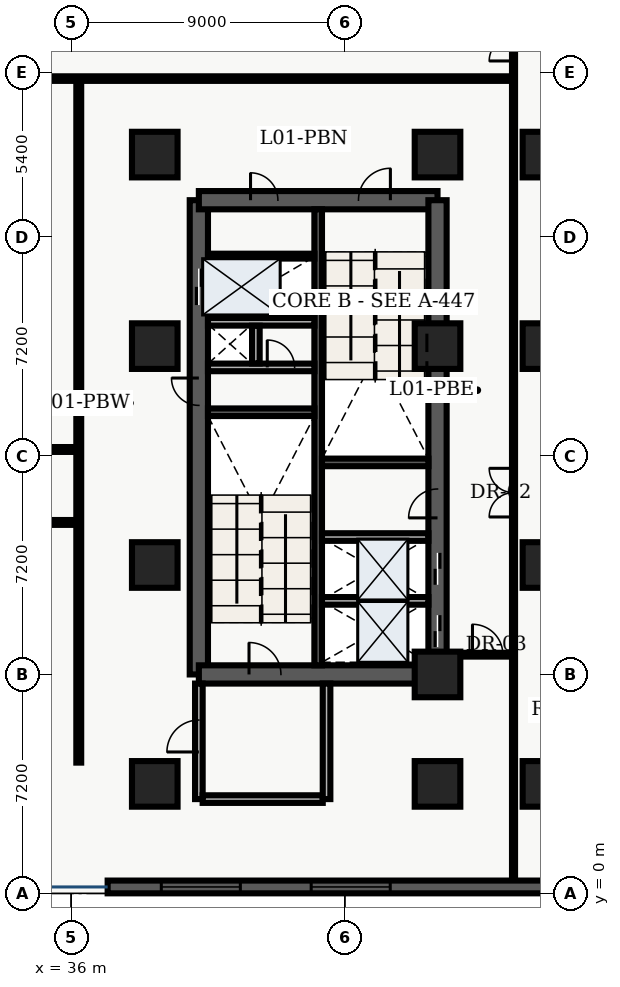
"""IFC4 building model, lengths in metres.
Left out: names, types, materials, properties, quantities, classifications, styles, units other than length and angle.
Written with IfcOpenShell. Run it as: python <this file> out.ifc"""

import sys

from ifc_helpers import new_model, entity, si_unit, converted_unit, direction, frame, origin_with_axes, origin_2d_with_axis, place, context, subcontext, project, spatial, polyline, rectangle, outline, extrude, element, fill, save


model = new_model("IFC4")
c1 = context("Model", 3, precision=1e-05, world=origin_with_axes(), true_north=direction((0.0, 1.0)))
c2 = subcontext(c1, "Body", "Model", "MODEL_VIEW")
j1 = project(units=[si_unit("LENGTHUNIT", "METRE"), converted_unit("PLANEANGLEUNIT", "DEGREE", entity("IfcPlaneAngleMeasure", 0.017), si_unit("PLANEANGLEUNIT", "RADIAN"), dimensions=[0, 0, 0, 0, 0, 0, 0])], contexts=[c1])
p1 = place(None, origin_with_axes())
s1 = spatial("IfcSite", under=j1, at=p1, CompositionType="ELEMENT")
p2 = place(p1, origin_with_axes())
s2 = spatial("IfcBuilding", under=s1, at=p2, CompositionType="ELEMENT")
p3 = place(p2, frame((0.0, 0.0, 5.7), z_axis=(0.0, 0.0, 1.0), x_axis=(1.0, 0.0, 0.0)))
s3 = spatial("IfcBuildingStorey", under=s2, at=p3, CompositionType="ELEMENT", Elevation=5.7)
p4 = place(p3, frame((40.2, 7.2, 0.0), z_axis=(0.0, 0.0, 1.0), x_axis=(0.0, 1.0, 0.0)))
e1 = element("IfcWall", 1, at=p4, inside=s3, PredefinedType="SHEAR", context=c2, shape_type="SweptSolid", body=[
    extrude(outline(polyline([(0.0, -0.3), (15.6, -0.3), (15.6, 0.3), (0.0, 0.3), (0.0, -0.3)])), origin_with_axes(), (0.0, 0.0, 1.0), 4.86),
])
p5 = place(p4, frame((12.75, 0.0, 0.0), z_axis=(0.0, 0.0, 1.0), x_axis=(1.0, 0.0, 0.0)))
e2 = element("IfcOpeningElement", 2, at=p5, cuts=e1, PredefinedType="OPENING", context=c2, shape_type="SweptSolid", body=[
    extrude(rectangle(XDim=1.2, YDim=0.62, at=origin_2d_with_axis()), origin_with_axes(), (0.0, 0.0, 1.0), 2.15),
])
p6 = place(p4, frame((9.3, 0.0, 0.0), z_axis=(0.0, 0.0, 1.0), x_axis=(1.0, 0.0, 0.0)))
e3 = element("IfcOpeningElement", 3, at=p6, cuts=e1, PredefinedType="OPENING", context=c2, shape_type="SweptSolid", body=[
    extrude(rectangle(XDim=0.9, YDim=0.62, at=origin_2d_with_axis()), origin_with_axes(), (0.0, 0.0, 1.0), 2.15),
])
p7 = place(p3, frame((40.2, 7.2, 0.0), z_axis=(0.0, 0.0, 1.0), x_axis=(1.0, 0.0, 0.0)))
e4 = element("IfcWall", 4, at=p7, inside=s3, PredefinedType="SHEAR", context=c2, shape_type="SweptSolid", body=[
    extrude(outline(polyline([(0.0, -0.3), (7.85, -0.3), (7.85, 0.3), (0.0, 0.3), (0.0, -0.3)])), origin_with_axes(), (0.0, 0.0, 1.0), 4.86),
])
p8 = place(p7, frame((2.175, 0.0, 0.0), z_axis=(0.0, 0.0, 1.0), x_axis=(1.0, 0.0, 0.0)))
e5 = element("IfcOpeningElement", 5, at=p8, cuts=e4, PredefinedType="OPENING", context=c2, shape_type="SweptSolid", body=[
    extrude(rectangle(XDim=1.05, YDim=0.62, at=origin_2d_with_axis()), origin_with_axes(), (0.0, 0.0, 1.0), 2.15),
])
p9 = place(p3, frame((40.2, 22.8, 0.0), z_axis=(0.0, 0.0, 1.0), x_axis=(1.0, 0.0, 0.0)))
e6 = element("IfcWall", 6, at=p9, inside=s3, PredefinedType="SHEAR", context=c2, shape_type="SweptSolid", body=[
    extrude(outline(polyline([(0.0, -0.3), (7.85, -0.3), (7.85, 0.3), (0.0, 0.3), (0.0, -0.3)])), origin_with_axes(), (0.0, 0.0, 1.0), 4.86),
])
p10 = place(p9, frame((5.775, 0.0, 0.0), z_axis=(0.0, 0.0, 1.0), x_axis=(1.0, 0.0, 0.0)))
e7 = element("IfcOpeningElement", 7, at=p10, cuts=e6, PredefinedType="OPENING", context=c2, shape_type="SweptSolid", body=[
    extrude(rectangle(XDim=1.05, YDim=0.62, at=origin_2d_with_axis()), origin_with_axes(), (0.0, 0.0, 1.0), 2.15),
])
p11 = place(p9, frame((2.15, 0.0, 0.0), z_axis=(0.0, 0.0, 1.0), x_axis=(1.0, 0.0, 0.0)))
e8 = element("IfcOpeningElement", 8, at=p11, cuts=e6, PredefinedType="OPENING", context=c2, shape_type="SweptSolid", body=[
    extrude(rectangle(XDim=0.9, YDim=0.62, at=origin_2d_with_axis()), origin_with_axes(), (0.0, 0.0, 1.0), 2.15),
])
p12 = place(p3, frame((48.05, 7.2, 0.0), z_axis=(0.0, 0.0, 1.0), x_axis=(0.0, 1.0, 0.0)))
e9 = element("IfcWall", 9, at=p12, inside=s3, PredefinedType="SHEAR", context=c2, shape_type="SweptSolid", body=[
    extrude(outline(polyline([(0.0, -0.3), (15.6, -0.3), (15.6, 0.3), (0.0, 0.3), (0.0, -0.3)])), origin_with_axes(), (0.0, 0.0, 1.0), 4.86),
])
p13 = place(p12, frame((1.425, 0.0, 0.0), z_axis=(0.0, 0.0, 1.0), x_axis=(1.0, 0.0, 0.0)))
e10 = element("IfcOpeningElement", 10, at=p13, cuts=e9, PredefinedType="OPENING", context=c2, shape_type="SweptSolid", body=[
    extrude(rectangle(XDim=1.05, YDim=0.62, at=origin_2d_with_axis()), origin_with_axes(), (0.0, 0.0, 1.0), 2.15),
])
p14 = place(p12, frame((3.475, 0.0, 0.0), z_axis=(0.0, 0.0, 1.0), x_axis=(1.0, 0.0, 0.0)))
e11 = element("IfcOpeningElement", 11, at=p14, cuts=e9, PredefinedType="OPENING", context=c2, shape_type="SweptSolid", body=[
    extrude(rectangle(XDim=1.05, YDim=0.62, at=origin_2d_with_axis()), origin_with_axes(), (0.0, 0.0, 1.0), 2.15),
])
p15 = place(p12, frame((5.625, 0.0, 0.0), z_axis=(0.0, 0.0, 1.0), x_axis=(1.0, 0.0, 0.0)))
e12 = element("IfcOpeningElement", 12, at=p15, cuts=e9, PredefinedType="OPENING", context=c2, shape_type="SweptSolid", body=[
    extrude(rectangle(XDim=0.95, YDim=0.62, at=origin_2d_with_axis()), origin_with_axes(), (0.0, 0.0, 1.0), 2.15),
])
p16 = place(p3, frame((44.125, 7.5, 0.0), z_axis=(0.0, 0.0, 1.0), x_axis=(0.0, 1.0, 0.0)))
e13 = element("IfcWall", 13, at=p16, inside=s3, PredefinedType="SHEAR", context=c2, shape_type="SweptSolid", body=[
    extrude(outline(polyline([(0.0, -0.125), (15.0, -0.125), (15.0, 0.125), (0.0, 0.125), (0.0, -0.125)])), origin_with_axes(), (0.0, 0.0, 1.0), 4.86),
])
for number, where, z_axis, x_axis in (
    (14, (40.5, 15.825, 0.0), (0.0, 0.0, 1.0), (1.0, 0.0, 0.0)),
    (15, (44.25, 14.175, 0.0), (0.0, 0.0, 1.0), (1.0, 0.0, 0.0)),
):
    element("IfcWall", number, at=place(p3, frame(where, z_axis=z_axis, x_axis=x_axis)), inside=s3, PredefinedType="SHEAR", context=c2, shape_type="SweptSolid", body=[
        extrude(outline(polyline([(0.0, -0.125), (3.5, -0.125), (3.5, 0.125), (0.0, 0.125), (0.0, -0.125)])), origin_with_axes(), (0.0, 0.0, 1.0), 4.86),
    ])
p17 = place(p3, frame((40.5, 17.3, 0.0), z_axis=(0.0, 0.0, 1.0), x_axis=(1.0, 0.0, 0.0)))
e16 = element("IfcWall", 16, at=p17, inside=s3, PredefinedType="SOLIDWALL", context=c2, shape_type="SweptSolid", body=[
    extrude(outline(polyline([(0.0, -0.125), (3.5, -0.125), (3.5, 0.125), (0.0, 0.125), (0.0, -0.125)])), origin_with_axes(), (0.0, 0.0, 1.0), 3.6),
])
p18 = place(p17, frame((2.4, 0.0, 0.0), z_axis=(0.0, 0.0, 1.0), x_axis=(1.0, 0.0, 0.0)))
e17 = element("IfcOpeningElement", 17, at=p18, cuts=e16, PredefinedType="OPENING", context=c2, shape_type="SweptSolid", body=[
    extrude(rectangle(XDim=0.9, YDim=0.27, at=origin_2d_with_axis()), origin_with_axes(), (0.0, 0.0, 1.0), 2.15),
])
p19 = place(p3, frame((40.5, 18.8, 0.0), z_axis=(0.0, 0.0, 1.0), x_axis=(1.0, 0.0, 0.0)))
e18 = element("IfcWall", 18, at=p19, inside=s3, PredefinedType="SOLIDWALL", context=c2, shape_type="SweptSolid", body=[
    extrude(outline(polyline([(0.0, -0.125), (3.5, -0.125), (3.5, 0.125), (0.0, 0.125), (0.0, -0.125)])), origin_with_axes(), (0.0, 0.0, 1.0), 3.6),
])
p20 = place(p3, frame((42.075, 17.43, 0.0), z_axis=(0.0, 0.0, 1.0), x_axis=(0.0, 1.0, 0.0)))
e19 = element("IfcWall", 19, at=p20, inside=s3, PredefinedType="SOLIDWALL", context=c2, shape_type="SweptSolid", body=[
    extrude(outline(polyline([(0.0, -0.125), (1.24, -0.125), (1.24, 0.125), (0.0, 0.125), (0.0, -0.125)])), origin_with_axes(), (0.0, 0.0, 1.0), 3.6),
])
p21 = place(p3, frame((40.2, 3.1, 0.0), z_axis=(0.0, 0.0, 1.0), x_axis=(0.0, 1.0, 0.0)))
e20 = element("IfcWall", 20, at=p21, inside=s3, PredefinedType="SOLIDWALL", context=c2, shape_type="SweptSolid", body=[
    extrude(outline(polyline([(0.0, -0.125), (3.8, -0.125), (3.8, 0.125), (0.0, 0.125), (0.0, -0.125)])), origin_with_axes(), (0.0, 0.0, 1.0), 3.6),
])
p22 = place(p21, frame((2.075, 0.0, 0.0), z_axis=(0.0, 0.0, 1.0), x_axis=(1.0, 0.0, 0.0)))
e21 = element("IfcOpeningElement", 21, at=p22, cuts=e20, PredefinedType="OPENING", context=c2, shape_type="SweptSolid", body=[
    extrude(rectangle(XDim=1.05, YDim=0.27, at=origin_2d_with_axis()), origin_with_axes(), (0.0, 0.0, 1.0), 2.15),
])
p23 = place(p3, frame((40.325, 3.1, 0.0), z_axis=(0.0, 0.0, 1.0), x_axis=(1.0, 0.0, 0.0)))
e22 = element("IfcWall", 22, at=p23, inside=s3, PredefinedType="SOLIDWALL", context=c2, shape_type="SweptSolid", body=[
    extrude(outline(polyline([(0.0, -0.125), (3.95, -0.125), (3.95, 0.125), (0.0, 0.125), (0.0, -0.125)])), origin_with_axes(), (0.0, 0.0, 1.0), 3.6),
])
p24 = place(p3, frame((44.4, 3.1, 0.0), z_axis=(0.0, 0.0, 1.0), x_axis=(0.0, 1.0, 0.0)))
e23 = element("IfcWall", 23, at=p24, inside=s3, PredefinedType="SOLIDWALL", context=c2, shape_type="SweptSolid", body=[
    extrude(outline(polyline([(0.0, -0.125), (3.8, -0.125), (3.8, 0.125), (0.0, 0.125), (0.0, -0.125)])), origin_with_axes(), (0.0, 0.0, 1.0), 3.6),
])
for number, where, z_axis, x_axis in (
    (24, (38.75, 3.6, 0.0), (0.0, 0.0, 1.0), (1.0, 0.0, 0.0)),
    (25, (38.75, 10.8, 0.0), (0.0, 0.0, 1.0), (1.0, 0.0, 0.0)),
    (26, (38.75, 18.0, 0.0), (0.0, 0.0, 1.0), (1.0, 0.0, 0.0)),
    (27, (38.75, 24.3, 0.0), (0.0, 0.0, 1.0), (1.0, 0.0, 0.0)),
    (28, (48.05, 3.6, 0.0), (0.0, 0.0, 1.0), (1.0, 0.0, 0.0)),
    (29, (48.05, 7.2, 0.0), (0.0, 0.0, 1.0), (1.0, 0.0, 0.0)),
    (30, (48.05, 18.0, 0.0), (0.0, 0.0, 1.0), (1.0, 0.0, 0.0)),
    (31, (48.05, 24.3, 0.0), (0.0, 0.0, 1.0), (1.0, 0.0, 0.0)),
    (32, (51.6, 3.6, 0.0), (0.0, 0.0, 1.0), (1.0, 0.0, 0.0)),
    (33, (51.6, 10.8, 0.0), (0.0, 0.0, 1.0), (1.0, 0.0, 0.0)),
    (34, (51.6, 18.0, 0.0), (0.0, 0.0, 1.0), (1.0, 0.0, 0.0)),
    (35, (51.6, 24.3, 0.0), (0.0, 0.0, 1.0), (1.0, 0.0, 0.0)),
):
    element("IfcColumn", number, at=place(p3, frame(where, z_axis=z_axis, x_axis=x_axis)), inside=s3, PredefinedType="COLUMN", context=c2, shape_type="SweptSolid", body=[
        extrude(rectangle(XDim=1.5, YDim=1.5, at=origin_2d_with_axis()), origin_with_axes(), (0.0, 0.0, 1.0), 5.1),
    ])
p25 = place(p3, frame((40.5, 20.96, 0.0), z_axis=(0.0, 0.0, 1.0), x_axis=(1.0, 0.0, 0.0)))
e36 = element("IfcWall", 36, at=p25, inside=s3, PredefinedType="PARTITIONING", context=c2, shape_type="SweptSolid", body=[
    extrude(outline(polyline([(0.0, -0.08), (3.5, -0.08), (3.5, 0.08), (0.0, 0.08), (0.0, -0.08)])), origin_with_axes(), (0.0, 0.0, 1.0), 3.2),
])
for number, where, z_axis, x_axis in (
    (37, (44.25, 9.62, 0.0), (0.0, 0.0, 1.0), (1.0, 0.0, 0.0)),
    (38, (44.25, 11.72, 0.0), (0.0, 0.0, 1.0), (1.0, 0.0, 0.0)),
):
    element("IfcWall", number, at=place(p3, frame(where, z_axis=z_axis, x_axis=x_axis)), inside=s3, PredefinedType="SOLIDWALL", context=c2, shape_type="SweptSolid", body=[
        extrude(outline(polyline([(0.0, -0.125), (3.5, -0.125), (3.5, 0.125), (0.0, 0.125), (0.0, -0.125)])), origin_with_axes(), (0.0, 0.0, 1.0), 3.2),
    ])
p26 = place(p3, frame((21.3, 12.2, 0.0), z_axis=(0.0, 0.0, 1.0), x_axis=(1.0, 0.0, 0.0)))
e39 = element("IfcWall", 39, at=p26, inside=s3, PredefinedType="PARTITIONING", context=c2, shape_type="SweptSolid", body=[
    extrude(outline(polyline([(0.0, -0.08), (14.95, -0.08), (14.95, 0.08), (0.0, 0.08), (0.0, -0.08)])), origin_with_axes(), (0.0, 0.0, 1.0), 3.2),
])
p27 = place(p26, frame((8.25, 0.0, 0.0), z_axis=(0.0, 0.0, 1.0), x_axis=(1.0, 0.0, 0.0)))
e40 = element("IfcOpeningElement", 40, at=p27, cuts=e39, PredefinedType="OPENING", context=c2, shape_type="SweptSolid", body=[
    extrude(rectangle(XDim=1.5, YDim=0.18, at=origin_2d_with_axis()), origin_with_axes(), (0.0, 0.0, 1.0), 2.2),
])
p28 = place(p3, frame((21.3, 14.6, 0.0), z_axis=(0.0, 0.0, 1.0), x_axis=(1.0, 0.0, 0.0)))
e41 = element("IfcWall", 41, at=p28, inside=s3, PredefinedType="PARTITIONING", context=c2, shape_type="SweptSolid", body=[
    extrude(outline(polyline([(0.0, -0.08), (14.95, -0.08), (14.95, 0.08), (0.0, 0.08), (0.0, -0.08)])), origin_with_axes(), (0.0, 0.0, 1.0), 3.2),
])
p29 = place(p28, frame((8.25, 0.0, 0.0), z_axis=(0.0, 0.0, 1.0), x_axis=(1.0, 0.0, 0.0)))
e42 = element("IfcOpeningElement", 42, at=p29, cuts=e41, PredefinedType="OPENING", context=c2, shape_type="SweptSolid", body=[
    extrude(rectangle(XDim=1.5, YDim=0.18, at=origin_2d_with_axis()), origin_with_axes(), (0.0, 0.0, 1.0), 2.2),
])
p30 = place(p3, frame((36.25, 4.3, 0.0), z_axis=(0.0, 0.0, 1.0), x_axis=(0.0, 1.0, 0.0)))
e43 = element("IfcWall", 43, at=p30, inside=s3, PredefinedType="PARTITIONING", context=c2, shape_type="SweptSolid", body=[
    extrude(outline(polyline([(0.0, -0.08), (22.5, -0.08), (22.5, 0.08), (0.0, 0.08), (0.0, -0.08)])), origin_with_axes(), (0.0, 0.0, 1.0), 3.2),
])
p31 = place(p3, frame((50.55, 0.38, 0.0), z_axis=(0.0, 0.0, 1.0), x_axis=(0.0, 1.0, 0.0)))
e44 = element("IfcWall", 44, at=p31, inside=s3, PredefinedType="PARTITIONING", context=c2, shape_type="SweptSolid", body=[
    extrude(outline(polyline([(0.0, -0.05), (38.84, -0.05), (38.84, 0.05), (0.0, 0.05), (0.0, -0.05)])), origin_with_axes(), (0.0, 0.0, 1.0), 3.2),
])
p32 = place(p31, frame((12.8, 0.0, 0.0), z_axis=(0.0, 0.0, 1.0), x_axis=(1.0, 0.0, 0.0)))
e45 = element("IfcOpeningElement", 45, at=p32, cuts=e44, PredefinedType="OPENING", context=c2, shape_type="SweptSolid", body=[
    extrude(rectangle(XDim=1.6, YDim=0.12, at=origin_2d_with_axis()), origin_with_axes(), (0.0, 0.0, 1.0), 2.2),
])
p33 = place(p31, frame((27.8, 0.0, 0.0), z_axis=(0.0, 0.0, 1.0), x_axis=(1.0, 0.0, 0.0)))
e46 = element("IfcOpeningElement", 46, at=p33, cuts=e44, PredefinedType="OPENING", context=c2, shape_type="SweptSolid", body=[
    extrude(rectangle(XDim=1.6, YDim=0.12, at=origin_2d_with_axis()), origin_with_axes(), (0.0, 0.0, 1.0), 2.2),
])
p34 = place(p3, frame((48.05, 7.85, 0.0), z_axis=(0.0, 0.0, 1.0), x_axis=(1.0, 0.0, 0.0)))
e47 = element("IfcWall", 47, at=p34, inside=s3, PredefinedType="PARTITIONING", context=c2, shape_type="SweptSolid", body=[
    extrude(outline(polyline([(0.0, -0.062), (2.5, -0.062), (2.5, 0.062), (0.0, 0.062), (0.0, -0.062)])), origin_with_axes(), (0.0, 0.0, 1.0), 3.2),
])
p35 = place(p34, frame((1.65, 0.0, 0.0), z_axis=(0.0, 0.0, 1.0), x_axis=(1.0, 0.0, 0.0)))
e48 = element("IfcOpeningElement", 48, at=p35, cuts=e47, PredefinedType="OPENING", context=c2, shape_type="SweptSolid", body=[
    extrude(rectangle(XDim=1.0, YDim=0.145, at=origin_2d_with_axis()), origin_with_axes(), (0.0, 0.0, 1.0), 2.15),
])
p36 = place(p3, frame((21.3, 26.8, 0.0), z_axis=(0.0, 0.0, 1.0), x_axis=(1.0, 0.0, 0.0)))
e49 = element("IfcWall", 49, at=p36, inside=s3, PredefinedType="PARTITIONING", context=c2, shape_type="SweptSolid", body=[
    extrude(outline(polyline([(0.0, -0.075), (29.25, -0.075), (29.25, 0.075), (0.0, 0.075), (0.0, -0.075)])), origin_with_axes(), (0.0, 0.0, 1.0), 3.2),
])
p37 = place(p3, frame((67.98, 0.21, 0.0), z_axis=(0.0, 0.0, 1.0), x_axis=(-1.0, 0.0, 0.0)))
e50 = element("IfcWall", 50, at=p37, inside=s3, PredefinedType="SOLIDWALL", context=c2, shape_type="SweptSolid", body=[
    extrude(outline(polyline([(0.0, -0.21), (30.78, -0.21), (30.78, 0.21), (0.0, 0.21), (0.0, -0.21)])), origin_with_axes(), (0.0, 0.0, 1.0), 4.86),
])
p38 = place(p37, frame((3.065, 0.0, 0.45), z_axis=(0.0, 0.0, 1.0), x_axis=(1.0, 0.0, 0.0)))
e51 = element("IfcOpeningElement", 51, at=p38, cuts=e50, PredefinedType="OPENING", context=c2, shape_type="SweptSolid", body=[
    extrude(rectangle(XDim=2.6, YDim=0.44, at=origin_2d_with_axis()), origin_with_axes(), (0.0, 0.0, 1.0), 2.8),
])
p39 = place(p37, frame((7.995, 0.0, 0.45), z_axis=(0.0, 0.0, 1.0), x_axis=(1.0, 0.0, 0.0)))
e52 = element("IfcOpeningElement", 52, at=p39, cuts=e50, PredefinedType="OPENING", context=c2, shape_type="SweptSolid", body=[
    extrude(rectangle(XDim=2.6, YDim=0.44, at=origin_2d_with_axis()), origin_with_axes(), (0.0, 0.0, 1.0), 2.8),
])
p40 = place(p37, frame((12.925, 0.0, 0.45), z_axis=(0.0, 0.0, 1.0), x_axis=(1.0, 0.0, 0.0)))
e53 = element("IfcOpeningElement", 53, at=p40, cuts=e50, PredefinedType="OPENING", context=c2, shape_type="SweptSolid", body=[
    extrude(rectangle(XDim=2.6, YDim=0.44, at=origin_2d_with_axis()), origin_with_axes(), (0.0, 0.0, 1.0), 2.8),
])
p41 = place(p37, frame((22.785, 0.0, 0.45), z_axis=(0.0, 0.0, 1.0), x_axis=(1.0, 0.0, 0.0)))
e54 = element("IfcOpeningElement", 54, at=p41, cuts=e50, PredefinedType="OPENING", context=c2, shape_type="SweptSolid", body=[
    extrude(rectangle(XDim=2.6, YDim=0.44, at=origin_2d_with_axis()), origin_with_axes(), (0.0, 0.0, 1.0), 2.8),
])
p42 = place(p37, frame((27.715, 0.0, 0.45), z_axis=(0.0, 0.0, 1.0), x_axis=(1.0, 0.0, 0.0)))
e55 = element("IfcOpeningElement", 55, at=p42, cuts=e50, PredefinedType="OPENING", context=c2, shape_type="SweptSolid", body=[
    extrude(rectangle(XDim=2.6, YDim=0.44, at=origin_2d_with_axis()), origin_with_axes(), (0.0, 0.0, 1.0), 2.8),
])
p43 = place(p12, frame((1.425, 0.0, 0.0), z_axis=(0.0, 0.0, 1.0), x_axis=(1.0, 0.0, 0.0)))
e56 = element("IfcDoor", 56, at=p43, inside=s3, OperationType="SLIDING_TO_LEFT", PredefinedType="DOOR", context=c2, shape_type="SweptSolid", body=[
    extrude(rectangle(XDim=1.05, YDim=0.09, at=origin_2d_with_axis()), origin_with_axes(), (0.0, 0.0, 1.0), 2.15),
])
fill(e10, e56)
p44 = place(p12, frame((3.475, 0.0, 0.0), z_axis=(0.0, 0.0, 1.0), x_axis=(1.0, 0.0, 0.0)))
e57 = element("IfcDoor", 57, at=p44, inside=s3, OperationType="SLIDING_TO_RIGHT", PredefinedType="DOOR", context=c2, shape_type="SweptSolid", body=[
    extrude(rectangle(XDim=1.05, YDim=0.09, at=origin_2d_with_axis()), origin_with_axes(), (0.0, 0.0, 1.0), 2.15),
])
fill(e11, e57)
p45 = place(p4, frame((12.75, 0.0, 0.0), z_axis=(0.0, 0.0, 1.0), x_axis=(1.0, 0.0, 0.0)))
e58 = element("IfcDoor", 58, at=p45, inside=s3, OperationType="DOUBLE_DOOR_SLIDING", PredefinedType="DOOR", context=c2, shape_type="SweptSolid", body=[
    extrude(rectangle(XDim=1.2, YDim=0.09, at=origin_2d_with_axis()), origin_with_axes(), (0.0, 0.0, 1.0), 2.15),
])
fill(e2, e58)
p46 = place(p4, frame((9.3, 0.0, 0.0), z_axis=(0.0, 0.0, 1.0), x_axis=(1.0, 0.0, 0.0)))
e59 = element("IfcDoor", 59, at=p46, inside=s3, OperationType="SINGLE_SWING_RIGHT", PredefinedType="DOOR", context=c2, shape_type="SweptSolid", body=[
    extrude(rectangle(XDim=0.9, YDim=0.09, at=origin_2d_with_axis()), origin_with_axes(), (0.0, 0.0, 1.0), 2.15),
])
fill(e3, e59)
p47 = place(p17, frame((2.4, 0.0, 0.0), z_axis=(0.0, 0.0, 1.0), x_axis=(1.0, 0.0, 0.0)))
e60 = element("IfcDoor", 60, at=p47, inside=s3, OperationType="SINGLE_SWING_LEFT", PredefinedType="DOOR", context=c2, shape_type="SweptSolid", body=[
    extrude(rectangle(XDim=0.9, YDim=0.09, at=origin_2d_with_axis()), origin_with_axes(), (0.0, 0.0, 1.0), 2.15),
])
fill(e17, e60)
p48 = place(p7, frame((2.175, 0.0, 0.0), z_axis=(0.0, 0.0, 1.0), x_axis=(1.0, 0.0, 0.0)))
e61 = element("IfcDoor", 61, at=p48, inside=s3, OperationType="SINGLE_SWING_LEFT", PredefinedType="DOOR", context=c2, shape_type="SweptSolid", body=[
    extrude(rectangle(XDim=1.05, YDim=0.09, at=origin_2d_with_axis()), origin_with_axes(), (0.0, 0.0, 1.0), 2.15),
])
fill(e5, e61)
p49 = place(p9, frame((5.775, 0.0, 0.0), z_axis=(0.0, 0.0, 1.0), x_axis=(1.0, 0.0, 0.0)))
e62 = element("IfcDoor", 62, at=p49, inside=s3, OperationType="SINGLE_SWING_RIGHT", PredefinedType="DOOR", context=c2, shape_type="SweptSolid", body=[
    extrude(rectangle(XDim=1.05, YDim=0.09, at=origin_2d_with_axis()), origin_with_axes(), (0.0, 0.0, 1.0), 2.15),
])
fill(e7, e62)
p50 = place(p21, frame((2.075, 0.0, 0.0), z_axis=(0.0, 0.0, 1.0), x_axis=(1.0, 0.0, 0.0)))
e63 = element("IfcDoor", 63, at=p50, inside=s3, OperationType="SINGLE_SWING_LEFT", PredefinedType="DOOR", context=c2, shape_type="SweptSolid", body=[
    extrude(rectangle(XDim=1.05, YDim=0.09, at=origin_2d_with_axis()), origin_with_axes(), (0.0, 0.0, 1.0), 2.15),
])
fill(e21, e63)
p51 = place(p9, frame((2.15, 0.0, 0.0), z_axis=(0.0, 0.0, 1.0), x_axis=(1.0, 0.0, 0.0)))
e64 = element("IfcDoor", 64, at=p51, inside=s3, OperationType="SINGLE_SWING_LEFT", PredefinedType="DOOR", context=c2, shape_type="SweptSolid", body=[
    extrude(rectangle(XDim=0.9, YDim=0.09, at=origin_2d_with_axis()), origin_with_axes(), (0.0, 0.0, 1.0), 2.15),
])
fill(e8, e64)
p52 = place(p12, frame((5.625, 0.0, 0.0), z_axis=(0.0, 0.0, 1.0), x_axis=(1.0, 0.0, 0.0)))
e65 = element("IfcDoor", 65, at=p52, inside=s3, OperationType="SINGLE_SWING_LEFT", PredefinedType="DOOR", context=c2, shape_type="SweptSolid", body=[
    extrude(rectangle(XDim=0.95, YDim=0.09, at=origin_2d_with_axis()), origin_with_axes(), (0.0, 0.0, 1.0), 2.15),
])
fill(e12, e65)
p53 = place(p34, frame((1.65, 0.0, 0.0), z_axis=(0.0, 0.0, 1.0), x_axis=(1.0, 0.0, 0.0)))
e66 = element("IfcDoor", 66, at=p53, inside=s3, OperationType="SINGLE_SWING_LEFT", PredefinedType="DOOR", context=c2, shape_type="SweptSolid", body=[
    extrude(rectangle(XDim=1.0, YDim=0.075, at=origin_2d_with_axis()), origin_with_axes(), (0.0, 0.0, 1.0), 2.15),
])
fill(e48, e66)
p54 = place(p31, frame((12.8, 0.0, 0.0), z_axis=(0.0, 0.0, 1.0), x_axis=(1.0, 0.0, 0.0)))
e67 = element("IfcDoor", 67, at=p54, inside=s3, OperationType="DOUBLE_DOOR_SINGLE_SWING", PredefinedType="DOOR", context=c2, shape_type="SweptSolid", body=[
    extrude(rectangle(XDim=1.6, YDim=0.06, at=origin_2d_with_axis()), origin_with_axes(), (0.0, 0.0, 1.0), 2.2),
])
fill(e45, e67)
p55 = place(p31, frame((27.8, 0.0, 0.0), z_axis=(0.0, 0.0, 1.0), x_axis=(1.0, 0.0, 0.0)))
e68 = element("IfcDoor", 68, at=p55, inside=s3, OperationType="DOUBLE_DOOR_SINGLE_SWING", PredefinedType="DOOR", context=c2, shape_type="SweptSolid", body=[
    extrude(rectangle(XDim=1.6, YDim=0.06, at=origin_2d_with_axis()), origin_with_axes(), (0.0, 0.0, 1.0), 2.2),
])
fill(e46, e68)
p56 = place(p37, frame((22.785, 0.0, 0.45), z_axis=(0.0, 0.0, 1.0), x_axis=(1.0, 0.0, 0.0)))
e69 = element("IfcWindow", 69, at=p56, inside=s3, PredefinedType="WINDOW", context=c2, shape_type="SweptSolid", body=[
    extrude(rectangle(XDim=2.6, YDim=0.09, at=origin_2d_with_axis()), origin_with_axes(), (0.0, 0.0, 1.0), 2.8),
])
fill(e54, e69)
p57 = place(p37, frame((27.715, 0.0, 0.45), z_axis=(0.0, 0.0, 1.0), x_axis=(1.0, 0.0, 0.0)))
e70 = element("IfcWindow", 70, at=p57, inside=s3, PredefinedType="WINDOW", context=c2, shape_type="SweptSolid", body=[
    extrude(rectangle(XDim=2.6, YDim=0.09, at=origin_2d_with_axis()), origin_with_axes(), (0.0, 0.0, 1.0), 2.8),
])
fill(e55, e70)
save(model, sys.argv[1])
